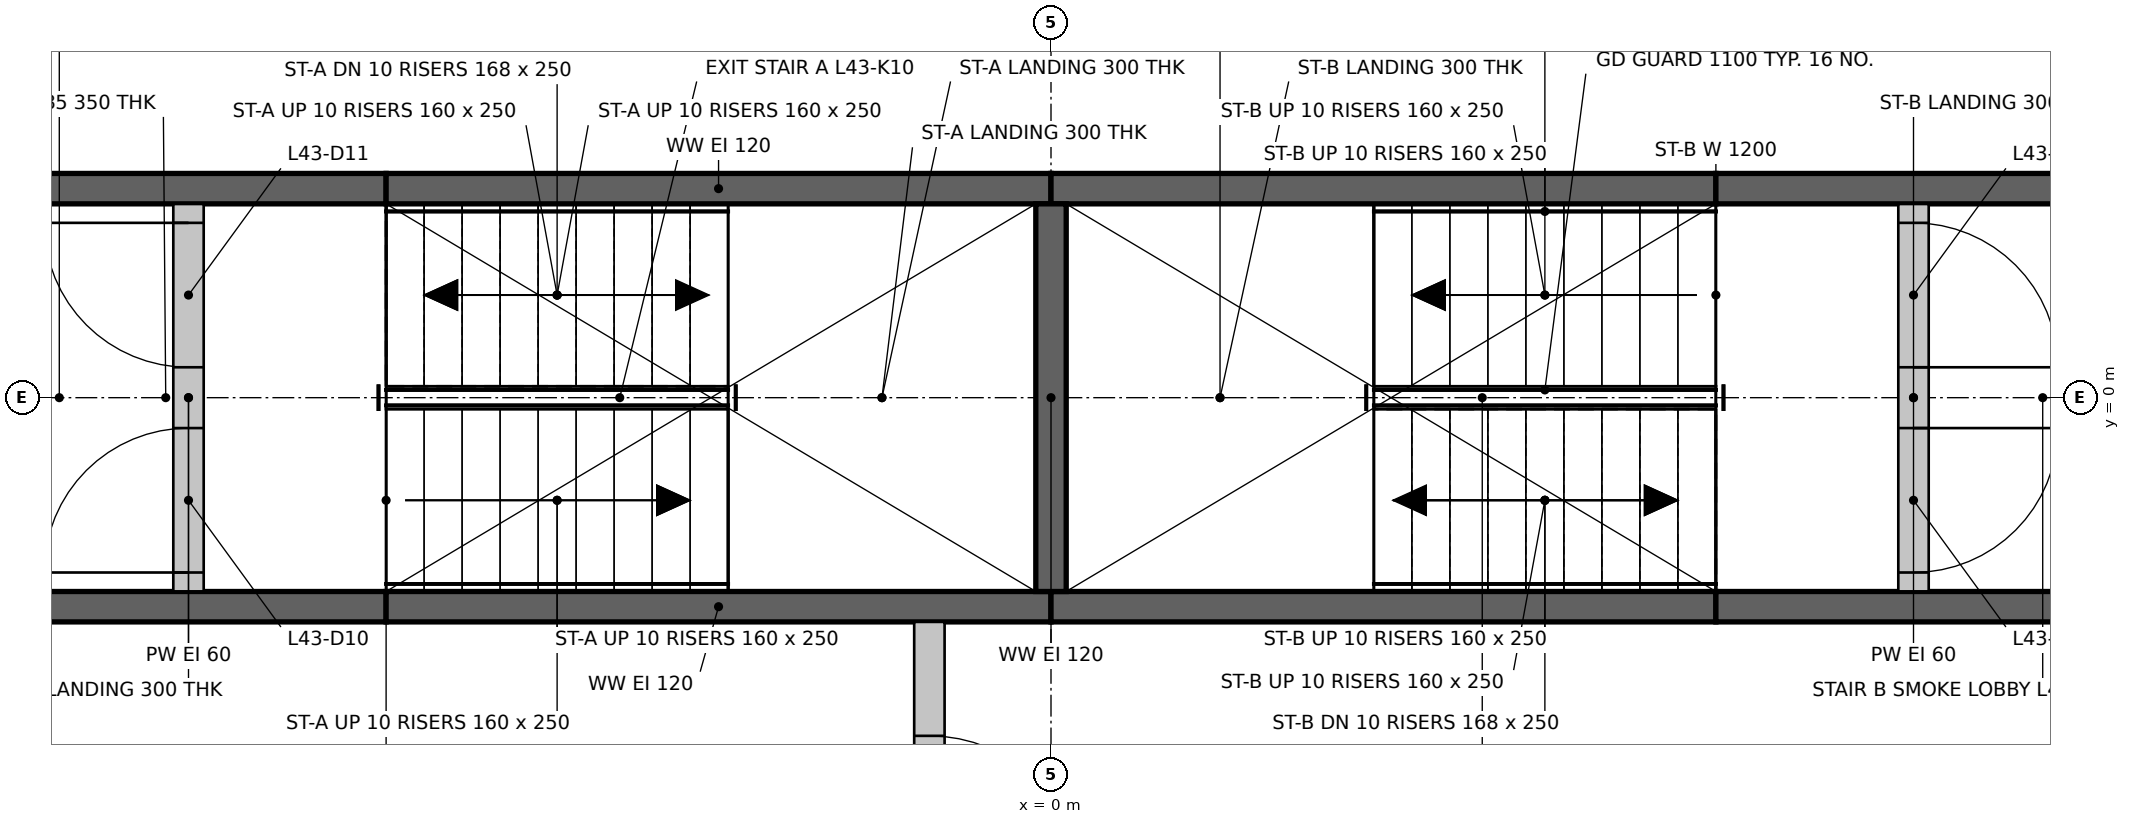
"""IFC4 building model, lengths in metres.
Left out: names, types, materials, properties, quantities, classifications, styles, units other than length and angle.
Written with IfcOpenShell. Run it as: python <this file> out.ifc"""

import sys

from ifc_helpers import new_model, si_unit, direction, frame, frame_2d, origin, place, context, subcontext, project, spatial, rectangle, extrude, element, fill, save


model = new_model("IFC4")
c1 = context("Model", 3, precision=1e-05, world=origin(), true_north=direction((0.0, 1.0)))
c2 = subcontext(c1, "Body", "Model", "MODEL_VIEW")
j1 = project(units=[si_unit("LENGTHUNIT", "METRE"), si_unit("PLANEANGLEUNIT", "RADIAN")], contexts=[c1])
p1 = place(None, origin())
s1 = spatial("IfcSite", under=j1, at=p1, CompositionType="ELEMENT")
p2 = place(p1, origin())
s2 = spatial("IfcBuilding", under=s1, at=p2, CompositionType="ELEMENT")
p3 = place(p2, frame((0.0, 0.0, 161.15)))
s3 = spatial("IfcBuildingStorey", under=s2, at=p3, CompositionType="ELEMENT", Elevation=161.15)
p4 = place(p3, frame((-7.274, -1.375, 0.0), z_axis=(0.0, 0.0, 1.0), x_axis=(1.0, 0.0, 0.0)))
e1 = element("IfcWall", 1, at=p4, inside=s3, PredefinedType="SHEAR", context=c2, shape_type="SweptSolid", body=[
    extrude(rectangle(XDim=2.9, YDim=0.2, at=frame_2d((1.45, 0.0))), origin(), (0.0, 0.0, 1.0), 6.05),
])
for number, where, z_axis, x_axis in (
    (2, (-4.374, -1.375, 0.0), (0.0, 0.0, 1.0), (1.0, 0.0, 0.0)),
    (3, (0.0, -1.375, 0.0), (0.0, 0.0, 1.0), (1.0, 0.0, 0.0)),
):
    element("IfcWall", number, at=place(p3, frame(where, z_axis=z_axis, x_axis=x_axis)), inside=s3, PredefinedType="SHEAR", context=c2, shape_type="SweptSolid", body=[
        extrude(rectangle(XDim=4.374, YDim=0.2, at=frame_2d((2.187, 0.0))), origin(), (0.0, 0.0, 1.0), 6.05),
    ])
for number, where, z_axis, x_axis in (
    (4, (4.374, -1.375, 0.0), (0.0, 0.0, 1.0), (1.0, 0.0, 0.0)),
    (5, (-7.274, 1.375, 0.0), (0.0, 0.0, 1.0), (1.0, 0.0, 0.0)),
):
    element("IfcWall", number, at=place(p3, frame(where, z_axis=z_axis, x_axis=x_axis)), inside=s3, PredefinedType="SHEAR", context=c2, shape_type="SweptSolid", body=[
        extrude(rectangle(XDim=2.9, YDim=0.2, at=frame_2d((1.45, 0.0))), origin(), (0.0, 0.0, 1.0), 6.05),
    ])
for number, where, z_axis, x_axis in (
    (6, (-4.374, 1.375, 0.0), (0.0, 0.0, 1.0), (1.0, 0.0, 0.0)),
    (7, (0.0, 1.375, 0.0), (0.0, 0.0, 1.0), (1.0, 0.0, 0.0)),
):
    element("IfcWall", number, at=place(p3, frame(where, z_axis=z_axis, x_axis=x_axis)), inside=s3, PredefinedType="SHEAR", context=c2, shape_type="SweptSolid", body=[
        extrude(rectangle(XDim=4.374, YDim=0.2, at=frame_2d((2.187, 0.0))), origin(), (0.0, 0.0, 1.0), 6.05),
    ])
p5 = place(p3, frame((4.374, 1.375, 0.0), z_axis=(0.0, 0.0, 1.0), x_axis=(1.0, 0.0, 0.0)))
e8 = element("IfcWall", 8, at=p5, inside=s3, PredefinedType="SHEAR", context=c2, shape_type="SweptSolid", body=[
    extrude(rectangle(XDim=2.9, YDim=0.2, at=frame_2d((1.45, 0.0))), origin(), (0.0, 0.0, 1.0), 6.05),
])
p6 = place(p3, frame((0.0, -1.275, 0.0), z_axis=(0.0, 0.0, 1.0), x_axis=(0.0, 1.0, 0.0)))
e9 = element("IfcWall", 9, at=p6, inside=s3, PredefinedType="SHEAR", context=c2, shape_type="SweptSolid", body=[
    extrude(rectangle(XDim=2.55, YDim=0.2, at=frame_2d((1.275, 0.0))), origin(), (0.0, 0.0, 1.0), 6.05),
])
p7 = place(p3, frame((-0.8, -3.974, 0.0), z_axis=(0.0, 0.0, 1.0), x_axis=(0.0, 1.0, 0.0)))
e10 = element("IfcWall", 10, at=p7, inside=s3, PredefinedType="PARTITIONING", context=c2, shape_type="SweptSolid", body=[
    extrude(rectangle(XDim=2.499, YDim=0.2, at=frame_2d((1.25, 0.0))), origin(), (0.0, 0.0, 1.0), 6.05),
])
p8 = place(p7, frame((0.75, 0.0, 0.0)))
e11 = element("IfcOpeningElement", 11, at=p8, cuts=e10, PredefinedType="OPENING", context=c2, shape_type="SweptSolid", body=[
    extrude(rectangle(XDim=1.0, YDim=2.1, at=frame_2d((0.5, 1.05))), frame((0.0, 0.11, 0.0), z_axis=(0.0, -1.0, 0.0), x_axis=(1.0, 0.0, 0.0)), (0.0, 0.0, 1.0), 0.22),
])
p9 = place(p3, frame((-5.674, -1.275, 0.0), z_axis=(0.0, 0.0, 1.0), x_axis=(0.0, 1.0, 0.0)))
e12 = element("IfcWall", 12, at=p9, inside=s3, PredefinedType="PARTITIONING", context=c2, shape_type="SweptSolid", body=[
    extrude(rectangle(XDim=2.55, YDim=0.2, at=frame_2d((1.275, 0.0))), origin(), (0.0, 0.0, 1.0), 6.05),
])
p10 = place(p9, frame((0.125, 0.0, 0.0)))
e13 = element("IfcOpeningElement", 13, at=p10, cuts=e12, PredefinedType="OPENING", context=c2, shape_type="SweptSolid", body=[
    extrude(rectangle(XDim=0.95, YDim=2.1, at=frame_2d((0.475, 1.05))), frame((0.0, 0.11, 0.0), z_axis=(0.0, -1.0, 0.0), x_axis=(1.0, 0.0, 0.0)), (0.0, 0.0, 1.0), 0.22),
])
p11 = place(p9, frame((1.475, 0.0, 0.0)))
e14 = element("IfcOpeningElement", 14, at=p11, cuts=e12, PredefinedType="OPENING", context=c2, shape_type="SweptSolid", body=[
    extrude(rectangle(XDim=0.95, YDim=2.1, at=frame_2d((0.475, 1.05))), frame((0.0, 0.11, 0.0), z_axis=(0.0, -1.0, 0.0), x_axis=(1.0, 0.0, 0.0)), (0.0, 0.0, 1.0), 0.22),
])
p12 = place(p3, frame((5.674, -1.275, 0.0), z_axis=(0.0, 0.0, 1.0), x_axis=(0.0, 1.0, 0.0)))
e15 = element("IfcWall", 15, at=p12, inside=s3, PredefinedType="PARTITIONING", context=c2, shape_type="SweptSolid", body=[
    extrude(rectangle(XDim=2.55, YDim=0.2, at=frame_2d((1.275, 0.0))), origin(), (0.0, 0.0, 1.0), 6.05),
])
p13 = place(p12, frame((0.125, 0.0, 0.0)))
e16 = element("IfcOpeningElement", 16, at=p13, cuts=e15, PredefinedType="OPENING", context=c2, shape_type="SweptSolid", body=[
    extrude(rectangle(XDim=0.95, YDim=2.1, at=frame_2d((0.475, 1.05))), frame((0.0, 0.11, 0.0), z_axis=(0.0, -1.0, 0.0), x_axis=(1.0, 0.0, 0.0)), (0.0, 0.0, 1.0), 0.22),
])
p14 = place(p12, frame((1.475, 0.0, 0.0)))
e17 = element("IfcOpeningElement", 17, at=p14, cuts=e15, PredefinedType="OPENING", context=c2, shape_type="SweptSolid", body=[
    extrude(rectangle(XDim=0.95, YDim=2.1, at=frame_2d((0.475, 1.05))), frame((0.0, 0.11, 0.0), z_axis=(0.0, -1.0, 0.0), x_axis=(1.0, 0.0, 0.0)), (0.0, 0.0, 1.0), 0.22),
])
p15 = place(p10, origin())
e18 = element("IfcDoor", 18, at=p15, inside=s3, OperationType="SINGLE_SWING_LEFT", PredefinedType="DOOR", context=c2, shape_type="SweptSolid", body=[
    extrude(rectangle(XDim=0.95, YDim=2.1, at=frame_2d((0.475, 1.05))), frame((0.0, 0.025, 0.0), z_axis=(0.0, -1.0, 0.0), x_axis=(1.0, 0.0, 0.0)), (0.0, 0.0, 1.0), 0.05),
])
fill(e13, e18)
p16 = place(p11, origin())
e19 = element("IfcDoor", 19, at=p16, inside=s3, OperationType="SINGLE_SWING_RIGHT", PredefinedType="DOOR", context=c2, shape_type="SweptSolid", body=[
    extrude(rectangle(XDim=0.95, YDim=2.1, at=frame_2d((0.475, 1.05))), frame((0.0, 0.025, 0.0), z_axis=(0.0, -1.0, 0.0), x_axis=(1.0, 0.0, 0.0)), (0.0, 0.0, 1.0), 0.05),
])
fill(e14, e19)
p17 = place(p13, frame((0.95, 0.0, 0.0), z_axis=(0.0, 0.0, 1.0), x_axis=(-1.0, 0.0, 0.0)))
e20 = element("IfcDoor", 20, at=p17, inside=s3, OperationType="SINGLE_SWING_RIGHT", PredefinedType="DOOR", context=c2, shape_type="SweptSolid", body=[
    extrude(rectangle(XDim=0.95, YDim=2.1, at=frame_2d((0.475, 1.05))), frame((0.0, 0.025, 0.0), z_axis=(0.0, -1.0, 0.0), x_axis=(1.0, 0.0, 0.0)), (0.0, 0.0, 1.0), 0.05),
])
fill(e16, e20)
p18 = place(p14, frame((0.95, 0.0, 0.0), z_axis=(0.0, 0.0, 1.0), x_axis=(-1.0, 0.0, 0.0)))
e21 = element("IfcDoor", 21, at=p18, inside=s3, OperationType="SINGLE_SWING_LEFT", PredefinedType="DOOR", context=c2, shape_type="SweptSolid", body=[
    extrude(rectangle(XDim=0.95, YDim=2.1, at=frame_2d((0.475, 1.05))), frame((0.0, 0.025, 0.0), z_axis=(0.0, -1.0, 0.0), x_axis=(1.0, 0.0, 0.0)), (0.0, 0.0, 1.0), 0.05),
])
fill(e17, e21)
p19 = place(p8, frame((1.0, 0.0, 0.0), z_axis=(0.0, 0.0, 1.0), x_axis=(-1.0, 0.0, 0.0)))
e22 = element("IfcDoor", 22, at=p19, inside=s3, OperationType="SINGLE_SWING_LEFT", PredefinedType="DOOR", context=c2, shape_type="SweptSolid", body=[
    extrude(rectangle(XDim=1.0, YDim=2.1, at=frame_2d((0.5, 1.05))), frame((0.0, 0.025, 0.0), z_axis=(0.0, -1.0, 0.0), x_axis=(1.0, 0.0, 0.0)), (0.0, 0.0, 1.0), 0.05),
])
fill(e11, e22)
save(model, sys.argv[1])
